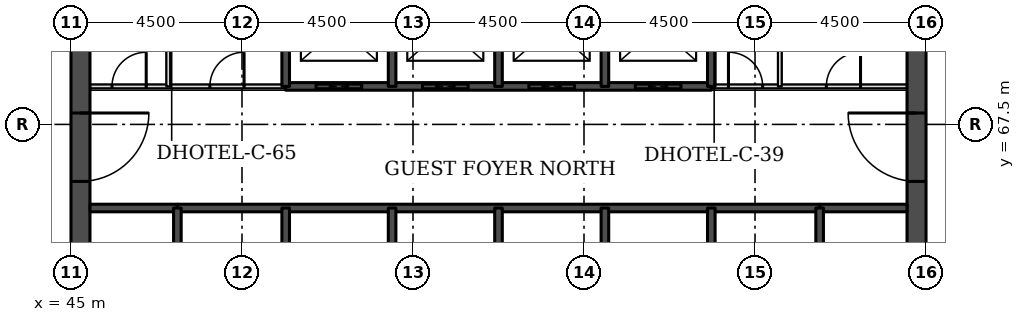
"""IFC4 building model, lengths in metres.
Left out: names, types, materials, properties, quantities, classifications, styles, units other than length and angle.
Written with IfcOpenShell. Run it as: python <this file> out.ifc"""

import sys

from ifc_helpers import new_model, si_unit, direction, frame, frame_2d, origin, place, context, subcontext, project, spatial, rectangle, extrude, element, fill, save


model = new_model("IFC4")
c1 = context("Model", 3, precision=1e-05, world=origin(), true_north=direction((0.0, 1.0)))
c2 = subcontext(c1, "Body", "Model", "MODEL_VIEW")
j1 = project(units=[si_unit("LENGTHUNIT", "METRE"), si_unit("PLANEANGLEUNIT", "RADIAN")], contexts=[c1])
p1 = place(None, origin())
s1 = spatial("IfcSite", under=j1, at=p1, CompositionType="ELEMENT")
p2 = place(p1, origin())
s2 = spatial("IfcBuilding", under=s1, at=p2, CompositionType="ELEMENT")
p3 = place(p2, frame((0.0, 0.0, 33.0)))
s3 = spatial("IfcBuildingStorey", under=s2, at=p3, CompositionType="ELEMENT", Elevation=33.0)
p4 = place(p3, frame((45.25, 49.5, 0.0), z_axis=(0.0, 0.0, 1.0), x_axis=(0.0, 1.0, 0.0)))
e1 = element("IfcWall", 1, at=p4, inside=s3, PredefinedType="SHEAR", context=c2, shape_type="SweptSolid", body=[
    extrude(rectangle(XDim=22.5, YDim=0.5, at=frame_2d((11.25, 0.0))), origin(), (0.0, 0.0, 1.0), 3.3),
])
p5 = place(p4, frame((4.2, 0.0, 0.0)))
e2 = element("IfcOpeningElement", 2, at=p5, cuts=e1, PredefinedType="OPENING", context=c2, shape_type="SweptSolid", body=[
    extrude(rectangle(XDim=1.8, YDim=2.1, at=frame_2d((0.9, 1.05))), frame((0.0, 0.26, 0.0), z_axis=(0.0, -1.0, 0.0), x_axis=(1.0, 0.0, 0.0)), (0.0, 0.0, 1.0), 0.52),
])
p6 = place(p4, frame((6.9, 0.0, 0.0)))
e3 = element("IfcOpeningElement", 3, at=p6, cuts=e1, PredefinedType="OPENING", context=c2, shape_type="SweptSolid", body=[
    extrude(rectangle(XDim=1.1, YDim=2.1, at=frame_2d((0.55, 1.05))), frame((0.0, 0.26, 0.0), z_axis=(0.0, -1.0, 0.0), x_axis=(1.0, 0.0, 0.0)), (0.0, 0.0, 1.0), 0.52),
])
p7 = place(p4, frame((13.6, 0.0, 0.0)))
e4 = element("IfcOpeningElement", 4, at=p7, cuts=e1, PredefinedType="OPENING", context=c2, shape_type="SweptSolid", body=[
    extrude(rectangle(XDim=1.1, YDim=2.1, at=frame_2d((0.55, 1.05))), frame((0.0, 0.26, 0.0), z_axis=(0.0, -1.0, 0.0), x_axis=(1.0, 0.0, 0.0)), (0.0, 0.0, 1.0), 0.52),
])
p8 = place(p4, frame((16.5, 0.0, 0.0)))
e5 = element("IfcOpeningElement", 5, at=p8, cuts=e1, PredefinedType="OPENING", context=c2, shape_type="SweptSolid", body=[
    extrude(rectangle(XDim=1.8, YDim=2.1, at=frame_2d((0.9, 1.05))), frame((0.0, 0.26, 0.0), z_axis=(0.0, -1.0, 0.0), x_axis=(1.0, 0.0, 0.0)), (0.0, 0.0, 1.0), 0.52),
])
p9 = place(p3, frame((67.25, 49.5, 0.0), z_axis=(0.0, 0.0, 1.0), x_axis=(0.0, 1.0, 0.0)))
e6 = element("IfcWall", 6, at=p9, inside=s3, PredefinedType="SHEAR", context=c2, shape_type="SweptSolid", body=[
    extrude(rectangle(XDim=22.5, YDim=0.5, at=frame_2d((11.25, 0.0))), origin(), (0.0, 0.0, 1.0), 3.3),
])
p10 = place(p9, frame((4.2, 0.0, 0.0)))
e7 = element("IfcOpeningElement", 7, at=p10, cuts=e6, PredefinedType="OPENING", context=c2, shape_type="SweptSolid", body=[
    extrude(rectangle(XDim=1.8, YDim=2.1, at=frame_2d((0.9, 1.05))), frame((0.0, 0.26, 0.0), z_axis=(0.0, -1.0, 0.0), x_axis=(1.0, 0.0, 0.0)), (0.0, 0.0, 1.0), 0.52),
])
p11 = place(p9, frame((6.9, 0.0, 0.0)))
e8 = element("IfcOpeningElement", 8, at=p11, cuts=e6, PredefinedType="OPENING", context=c2, shape_type="SweptSolid", body=[
    extrude(rectangle(XDim=1.1, YDim=2.1, at=frame_2d((0.55, 1.05))), frame((0.0, 0.26, 0.0), z_axis=(0.0, -1.0, 0.0), x_axis=(1.0, 0.0, 0.0)), (0.0, 0.0, 1.0), 0.52),
])
p12 = place(p9, frame((13.6, 0.0, 0.0)))
e9 = element("IfcOpeningElement", 9, at=p12, cuts=e6, PredefinedType="OPENING", context=c2, shape_type="SweptSolid", body=[
    extrude(rectangle(XDim=1.1, YDim=2.1, at=frame_2d((0.55, 1.05))), frame((0.0, 0.26, 0.0), z_axis=(0.0, -1.0, 0.0), x_axis=(1.0, 0.0, 0.0)), (0.0, 0.0, 1.0), 0.52),
])
p13 = place(p9, frame((16.5, 0.0, 0.0)))
e10 = element("IfcOpeningElement", 10, at=p13, cuts=e6, PredefinedType="OPENING", context=c2, shape_type="SweptSolid", body=[
    extrude(rectangle(XDim=1.8, YDim=2.1, at=frame_2d((0.9, 1.05))), frame((0.0, 0.26, 0.0), z_axis=(0.0, -1.0, 0.0), x_axis=(1.0, 0.0, 0.0)), (0.0, 0.0, 1.0), 0.52),
])
for number, where, z_axis, x_axis in (
    (11, (45.5, 65.3, 0.0), (0.0, 0.0, 1.0), (1.0, 0.0, 0.0)),
    (12, (64.7, 65.3, 0.0), (0.0, 0.0, 1.0), (1.0, 0.0, 0.0)),
):
    element("IfcWall", number, at=place(p3, frame(where, z_axis=z_axis, x_axis=x_axis)), inside=s3, PredefinedType="SOLIDWALL", context=c2, shape_type="SweptSolid", body=[
        extrude(rectangle(XDim=2.3, YDim=0.2, at=frame_2d((1.15, 0.0))), origin(), (0.0, 0.0, 1.0), 3.08),
    ])
p14 = place(p3, frame((47.8, 65.3, 0.0), z_axis=(0.0, 0.0, 1.0), x_axis=(1.0, 0.0, 0.0)))
e13 = element("IfcWall", 13, at=p14, inside=s3, PredefinedType="SOLIDWALL", context=c2, shape_type="SweptSolid", body=[
    extrude(rectangle(XDim=16.9, YDim=0.2, at=frame_2d((8.45, 0.0))), origin(), (0.0, 0.0, 1.0), 3.08),
])
p15 = place(p3, frame((45.5, 68.5, 0.0), z_axis=(0.0, 0.0, 1.0), x_axis=(1.0, 0.0, 0.0)))
e14 = element("IfcWall", 14, at=p15, inside=s3, PredefinedType="PARTITIONING", context=c2, shape_type="SweptSolid", body=[
    extrude(rectangle(XDim=5.15, YDim=0.1, at=frame_2d((2.575, 0.0))), origin(), (0.0, 0.0, 1.0), 3.08),
])
p16 = place(p15, frame((0.58, 0.0, 0.0)))
e15 = element("IfcOpeningElement", 15, at=p16, cuts=e14, PredefinedType="OPENING", context=c2, shape_type="SweptSolid", body=[
    extrude(rectangle(XDim=0.9, YDim=2.1, at=frame_2d((0.45, 1.05))), frame((0.0, 0.06, 0.0), z_axis=(0.0, -1.0, 0.0), x_axis=(1.0, 0.0, 0.0)), (0.0, 0.0, 1.0), 0.12),
])
p17 = place(p15, frame((3.155, 0.0, 0.0)))
e16 = element("IfcOpeningElement", 16, at=p17, cuts=e14, PredefinedType="OPENING", context=c2, shape_type="SweptSolid", body=[
    extrude(rectangle(XDim=0.9, YDim=2.1, at=frame_2d((0.45, 1.05))), frame((0.0, 0.06, 0.0), z_axis=(0.0, -1.0, 0.0), x_axis=(1.0, 0.0, 0.0)), (0.0, 0.0, 1.0), 0.12),
])
p18 = place(p3, frame((61.85, 68.5, 0.0), z_axis=(0.0, 0.0, 1.0), x_axis=(1.0, 0.0, 0.0)))
e17 = element("IfcWall", 17, at=p18, inside=s3, PredefinedType="PARTITIONING", context=c2, shape_type="SweptSolid", body=[
    extrude(rectangle(XDim=5.15, YDim=0.1, at=frame_2d((2.575, 0.0))), origin(), (0.0, 0.0, 1.0), 3.08),
])
p19 = place(p18, frame((3.026, 0.0, 0.0)))
e18 = element("IfcOpeningElement", 18, at=p19, cuts=e17, PredefinedType="OPENING", context=c2, shape_type="SweptSolid", body=[
    extrude(rectangle(XDim=0.9, YDim=2.1, at=frame_2d((0.45, 1.05))), frame((0.0, 0.06, 0.0), z_axis=(0.0, -1.0, 0.0), x_axis=(1.0, 0.0, 0.0)), (0.0, 0.0, 1.0), 0.12),
])
p20 = place(p18, frame((0.451, 0.0, 0.0)))
e19 = element("IfcOpeningElement", 19, at=p20, cuts=e17, PredefinedType="OPENING", context=c2, shape_type="SweptSolid", body=[
    extrude(rectangle(XDim=0.9, YDim=2.1, at=frame_2d((0.45, 1.05))), frame((0.0, 0.06, 0.0), z_axis=(0.0, -1.0, 0.0), x_axis=(1.0, 0.0, 0.0)), (0.0, 0.0, 1.0), 0.12),
])
p21 = place(p3, frame((50.65, 68.5, 0.0), z_axis=(0.0, 0.0, 1.0), x_axis=(1.0, 0.0, 0.0)))
e20 = element("IfcWall", 20, at=p21, inside=s3, PredefinedType="SOLIDWALL", context=c2, shape_type="SweptSolid", body=[
    extrude(rectangle(XDim=11.2, YDim=0.2, at=frame_2d((5.6, 0.0))), origin(), (0.0, 0.0, 1.0), 3.08),
])
p22 = place(p21, frame((0.8, 0.0, 0.0)))
e21 = element("IfcOpeningElement", 21, at=p22, cuts=e20, PredefinedType="OPENING", context=c2, shape_type="SweptSolid", body=[
    extrude(rectangle(XDim=1.2, YDim=2.1, at=frame_2d((0.6, 1.05))), frame((0.0, 0.11, 0.0), z_axis=(0.0, -1.0, 0.0), x_axis=(1.0, 0.0, 0.0)), (0.0, 0.0, 1.0), 0.22),
])
p23 = place(p21, frame((3.6, 0.0, 0.0)))
e22 = element("IfcOpeningElement", 22, at=p23, cuts=e20, PredefinedType="OPENING", context=c2, shape_type="SweptSolid", body=[
    extrude(rectangle(XDim=1.2, YDim=2.1, at=frame_2d((0.6, 1.05))), frame((0.0, 0.11, 0.0), z_axis=(0.0, -1.0, 0.0), x_axis=(1.0, 0.0, 0.0)), (0.0, 0.0, 1.0), 0.22),
])
p24 = place(p21, frame((6.4, 0.0, 0.0)))
e23 = element("IfcOpeningElement", 23, at=p24, cuts=e20, PredefinedType="OPENING", context=c2, shape_type="SweptSolid", body=[
    extrude(rectangle(XDim=1.2, YDim=2.1, at=frame_2d((0.6, 1.05))), frame((0.0, 0.11, 0.0), z_axis=(0.0, -1.0, 0.0), x_axis=(1.0, 0.0, 0.0)), (0.0, 0.0, 1.0), 0.22),
])
p25 = place(p21, frame((9.2, 0.0, 0.0)))
e24 = element("IfcOpeningElement", 24, at=p25, cuts=e20, PredefinedType="OPENING", context=c2, shape_type="SweptSolid", body=[
    extrude(rectangle(XDim=1.2, YDim=2.1, at=frame_2d((0.6, 1.05))), frame((0.0, 0.11, 0.0), z_axis=(0.0, -1.0, 0.0), x_axis=(1.0, 0.0, 0.0)), (0.0, 0.0, 1.0), 0.22),
])
p26 = place(p3, frame((47.56, 68.5, 0.0), z_axis=(0.0, 0.0, 1.0), x_axis=(0.0, 1.0, 0.0)))
e25 = element("IfcWall", 25, at=p26, inside=s3, PredefinedType="PARTITIONING", context=c2, shape_type="SweptSolid", body=[
    extrude(rectangle(XDim=3.0, YDim=0.1, at=frame_2d((1.5, 0.0))), origin(), (0.0, 0.0, 1.0), 3.08),
])
p27 = place(p3, frame((47.8, 62.0, 0.0), z_axis=(0.0, 0.0, 1.0), x_axis=(0.0, 1.0, 0.0)))
e26 = element("IfcWall", 26, at=p27, inside=s3, PredefinedType="SOLIDWALL", context=c2, shape_type="SweptSolid", body=[
    extrude(rectangle(XDim=3.3, YDim=0.2, at=frame_2d((1.65, 0.0))), origin(), (0.0, 0.0, 1.0), 3.08),
])
p28 = place(p27, frame((1.1, 0.0, 0.0)))
e27 = element("IfcOpeningElement", 27, at=p28, cuts=e26, PredefinedType="OPENING", context=c2, shape_type="SweptSolid", body=[
    extrude(rectangle(XDim=1.1, YDim=2.1, at=frame_2d((0.55, 1.05))), frame((0.0, 0.11, 0.0), z_axis=(0.0, -1.0, 0.0), x_axis=(1.0, 0.0, 0.0)), (0.0, 0.0, 1.0), 0.22),
])
p29 = place(p3, frame((50.65, 62.0, 0.0), z_axis=(0.0, 0.0, 1.0), x_axis=(0.0, 1.0, 0.0)))
e28 = element("IfcWall", 28, at=p29, inside=s3, PredefinedType="SOLIDWALL", context=c2, shape_type="SweptSolid", body=[
    extrude(rectangle(XDim=3.3, YDim=0.2, at=frame_2d((1.65, 0.0))), origin(), (0.0, 0.0, 1.0), 3.08),
])
p30 = place(p3, frame((50.65, 68.5, 0.0), z_axis=(0.0, 0.0, 1.0), x_axis=(0.0, 1.0, 0.0)))
e29 = element("IfcWall", 29, at=p30, inside=s3, PredefinedType="SOLIDWALL", context=c2, shape_type="SweptSolid", body=[
    extrude(rectangle(XDim=3.0, YDim=0.2, at=frame_2d((1.5, 0.0))), origin(), (0.0, 0.0, 1.0), 3.08),
])
p31 = place(p3, frame((53.45, 62.5, 0.0), z_axis=(0.0, 0.0, 1.0), x_axis=(0.0, 1.0, 0.0)))
e30 = element("IfcWall", 30, at=p31, inside=s3, PredefinedType="SOLIDWALL", context=c2, shape_type="SweptSolid", body=[
    extrude(rectangle(XDim=2.8, YDim=0.2, at=frame_2d((1.4, 0.0))), origin(), (0.0, 0.0, 1.0), 3.08),
])
p32 = place(p3, frame((53.45, 68.5, 0.0), z_axis=(0.0, 0.0, 1.0), x_axis=(0.0, 1.0, 0.0)))
e31 = element("IfcWall", 31, at=p32, inside=s3, PredefinedType="SOLIDWALL", context=c2, shape_type="SweptSolid", body=[
    extrude(rectangle(XDim=3.0, YDim=0.2, at=frame_2d((1.5, 0.0))), origin(), (0.0, 0.0, 1.0), 3.08),
])
p33 = place(p3, frame((56.25, 62.5, 0.0), z_axis=(0.0, 0.0, 1.0), x_axis=(0.0, 1.0, 0.0)))
e32 = element("IfcWall", 32, at=p33, inside=s3, PredefinedType="SOLIDWALL", context=c2, shape_type="SweptSolid", body=[
    extrude(rectangle(XDim=2.8, YDim=0.2, at=frame_2d((1.4, 0.0))), origin(), (0.0, 0.0, 1.0), 3.08),
])
p34 = place(p3, frame((56.25, 68.5, 0.0), z_axis=(0.0, 0.0, 1.0), x_axis=(0.0, 1.0, 0.0)))
e33 = element("IfcWall", 33, at=p34, inside=s3, PredefinedType="SOLIDWALL", context=c2, shape_type="SweptSolid", body=[
    extrude(rectangle(XDim=3.0, YDim=0.2, at=frame_2d((1.5, 0.0))), origin(), (0.0, 0.0, 1.0), 3.08),
])
p35 = place(p3, frame((59.05, 62.5, 0.0), z_axis=(0.0, 0.0, 1.0), x_axis=(0.0, 1.0, 0.0)))
e34 = element("IfcWall", 34, at=p35, inside=s3, PredefinedType="SOLIDWALL", context=c2, shape_type="SweptSolid", body=[
    extrude(rectangle(XDim=2.8, YDim=0.2, at=frame_2d((1.4, 0.0))), origin(), (0.0, 0.0, 1.0), 3.08),
])
p36 = place(p3, frame((59.05, 68.5, 0.0), z_axis=(0.0, 0.0, 1.0), x_axis=(0.0, 1.0, 0.0)))
e35 = element("IfcWall", 35, at=p36, inside=s3, PredefinedType="SOLIDWALL", context=c2, shape_type="SweptSolid", body=[
    extrude(rectangle(XDim=3.0, YDim=0.2, at=frame_2d((1.5, 0.0))), origin(), (0.0, 0.0, 1.0), 3.08),
])
p37 = place(p3, frame((61.85, 62.0, 0.0), z_axis=(0.0, 0.0, 1.0), x_axis=(0.0, 1.0, 0.0)))
e36 = element("IfcWall", 36, at=p37, inside=s3, PredefinedType="SOLIDWALL", context=c2, shape_type="SweptSolid", body=[
    extrude(rectangle(XDim=3.3, YDim=0.2, at=frame_2d((1.65, 0.0))), origin(), (0.0, 0.0, 1.0), 3.08),
])
p38 = place(p3, frame((61.85, 68.5, 0.0), z_axis=(0.0, 0.0, 1.0), x_axis=(0.0, 1.0, 0.0)))
e37 = element("IfcWall", 37, at=p38, inside=s3, PredefinedType="SOLIDWALL", context=c2, shape_type="SweptSolid", body=[
    extrude(rectangle(XDim=3.0, YDim=0.2, at=frame_2d((1.5, 0.0))), origin(), (0.0, 0.0, 1.0), 3.08),
])
p39 = place(p3, frame((63.653, 68.5, 0.0), z_axis=(0.0, 0.0, 1.0), x_axis=(0.0, 1.0, 0.0)))
e38 = element("IfcWall", 38, at=p39, inside=s3, PredefinedType="PARTITIONING", context=c2, shape_type="SweptSolid", body=[
    extrude(rectangle(XDim=3.0, YDim=0.1, at=frame_2d((1.5, 0.0))), origin(), (0.0, 0.0, 1.0), 3.08),
])
p40 = place(p3, frame((64.7, 62.0, 0.0), z_axis=(0.0, 0.0, 1.0), x_axis=(0.0, 1.0, 0.0)))
e39 = element("IfcWall", 39, at=p40, inside=s3, PredefinedType="SOLIDWALL", context=c2, shape_type="SweptSolid", body=[
    extrude(rectangle(XDim=3.3, YDim=0.2, at=frame_2d((1.65, 0.0))), origin(), (0.0, 0.0, 1.0), 3.08),
])
p41 = place(p40, frame((1.1, 0.0, 0.0)))
e40 = element("IfcOpeningElement", 40, at=p41, cuts=e39, PredefinedType="OPENING", context=c2, shape_type="SweptSolid", body=[
    extrude(rectangle(XDim=1.1, YDim=2.1, at=frame_2d((0.55, 1.05))), frame((0.0, 0.11, 0.0), z_axis=(0.0, -1.0, 0.0), x_axis=(1.0, 0.0, 0.0)), (0.0, 0.0, 1.0), 0.22),
])
p42 = place(p22, origin())
e41 = element("IfcDoor", 41, at=p42, inside=s3, OperationType="DOUBLE_DOOR_SLIDING", PredefinedType="DOOR", context=c2, shape_type="SweptSolid", body=[
    extrude(rectangle(XDim=1.2, YDim=2.1, at=frame_2d((0.6, 1.05))), frame((0.0, 0.025, 0.0), z_axis=(0.0, -1.0, 0.0), x_axis=(1.0, 0.0, 0.0)), (0.0, 0.0, 1.0), 0.05),
])
fill(e21, e41)
p43 = place(p23, origin())
e42 = element("IfcDoor", 42, at=p43, inside=s3, OperationType="DOUBLE_DOOR_SLIDING", PredefinedType="DOOR", context=c2, shape_type="SweptSolid", body=[
    extrude(rectangle(XDim=1.2, YDim=2.1, at=frame_2d((0.6, 1.05))), frame((0.0, 0.025, 0.0), z_axis=(0.0, -1.0, 0.0), x_axis=(1.0, 0.0, 0.0)), (0.0, 0.0, 1.0), 0.05),
])
fill(e22, e42)
p44 = place(p24, origin())
e43 = element("IfcDoor", 43, at=p44, inside=s3, OperationType="DOUBLE_DOOR_SLIDING", PredefinedType="DOOR", context=c2, shape_type="SweptSolid", body=[
    extrude(rectangle(XDim=1.2, YDim=2.1, at=frame_2d((0.6, 1.05))), frame((0.0, 0.025, 0.0), z_axis=(0.0, -1.0, 0.0), x_axis=(1.0, 0.0, 0.0)), (0.0, 0.0, 1.0), 0.05),
])
fill(e23, e43)
p45 = place(p25, origin())
e44 = element("IfcDoor", 44, at=p45, inside=s3, OperationType="DOUBLE_DOOR_SLIDING", PredefinedType="DOOR", context=c2, shape_type="SweptSolid", body=[
    extrude(rectangle(XDim=1.2, YDim=2.1, at=frame_2d((0.6, 1.05))), frame((0.0, 0.025, 0.0), z_axis=(0.0, -1.0, 0.0), x_axis=(1.0, 0.0, 0.0)), (0.0, 0.0, 1.0), 0.05),
])
fill(e24, e44)
p46 = place(p8, frame((1.8, 0.0, 0.0), z_axis=(0.0, 0.0, 1.0), x_axis=(-1.0, 0.0, 0.0)))
e45 = element("IfcDoor", 45, at=p46, inside=s3, OperationType="SINGLE_SWING_LEFT", PredefinedType="DOOR", context=c2, shape_type="SweptSolid", body=[
    extrude(rectangle(XDim=1.8, YDim=2.1, at=frame_2d((0.9, 1.05))), frame((0.0, 0.025, 0.0), z_axis=(0.0, -1.0, 0.0), x_axis=(1.0, 0.0, 0.0)), (0.0, 0.0, 1.0), 0.05),
])
fill(e5, e45)
p47 = place(p13, origin())
e46 = element("IfcDoor", 46, at=p47, inside=s3, OperationType="SINGLE_SWING_RIGHT", PredefinedType="DOOR", context=c2, shape_type="SweptSolid", body=[
    extrude(rectangle(XDim=1.8, YDim=2.1, at=frame_2d((0.9, 1.05))), frame((0.0, 0.025, 0.0), z_axis=(0.0, -1.0, 0.0), x_axis=(1.0, 0.0, 0.0)), (0.0, 0.0, 1.0), 0.05),
])
fill(e10, e46)
p48 = place(p19, origin())
e47 = element("IfcDoor", 47, at=p48, inside=s3, OperationType="SINGLE_SWING_RIGHT", PredefinedType="DOOR", context=c2, shape_type="SweptSolid", body=[
    extrude(rectangle(XDim=0.9, YDim=2.1, at=frame_2d((0.45, 1.05))), frame((0.0, 0.025, 0.0), z_axis=(0.0, -1.0, 0.0), x_axis=(1.0, 0.0, 0.0)), (0.0, 0.0, 1.0), 0.05),
])
fill(e18, e47)
p49 = place(p20, origin())
e48 = element("IfcDoor", 48, at=p49, inside=s3, OperationType="SINGLE_SWING_LEFT", PredefinedType="DOOR", context=c2, shape_type="SweptSolid", body=[
    extrude(rectangle(XDim=0.9, YDim=2.1, at=frame_2d((0.45, 1.05))), frame((0.0, 0.025, 0.0), z_axis=(0.0, -1.0, 0.0), x_axis=(1.0, 0.0, 0.0)), (0.0, 0.0, 1.0), 0.05),
])
fill(e19, e48)
p50 = place(p16, origin())
e49 = element("IfcDoor", 49, at=p50, inside=s3, OperationType="SINGLE_SWING_RIGHT", PredefinedType="DOOR", context=c2, shape_type="SweptSolid", body=[
    extrude(rectangle(XDim=0.9, YDim=2.1, at=frame_2d((0.45, 1.05))), frame((0.0, 0.025, 0.0), z_axis=(0.0, -1.0, 0.0), x_axis=(1.0, 0.0, 0.0)), (0.0, 0.0, 1.0), 0.05),
])
fill(e15, e49)
p51 = place(p17, origin())
e50 = element("IfcDoor", 50, at=p51, inside=s3, OperationType="SINGLE_SWING_RIGHT", PredefinedType="DOOR", context=c2, shape_type="SweptSolid", body=[
    extrude(rectangle(XDim=0.9, YDim=2.1, at=frame_2d((0.45, 1.05))), frame((0.0, 0.025, 0.0), z_axis=(0.0, -1.0, 0.0), x_axis=(1.0, 0.0, 0.0)), (0.0, 0.0, 1.0), 0.05),
])
fill(e16, e50)
save(model, sys.argv[1])
